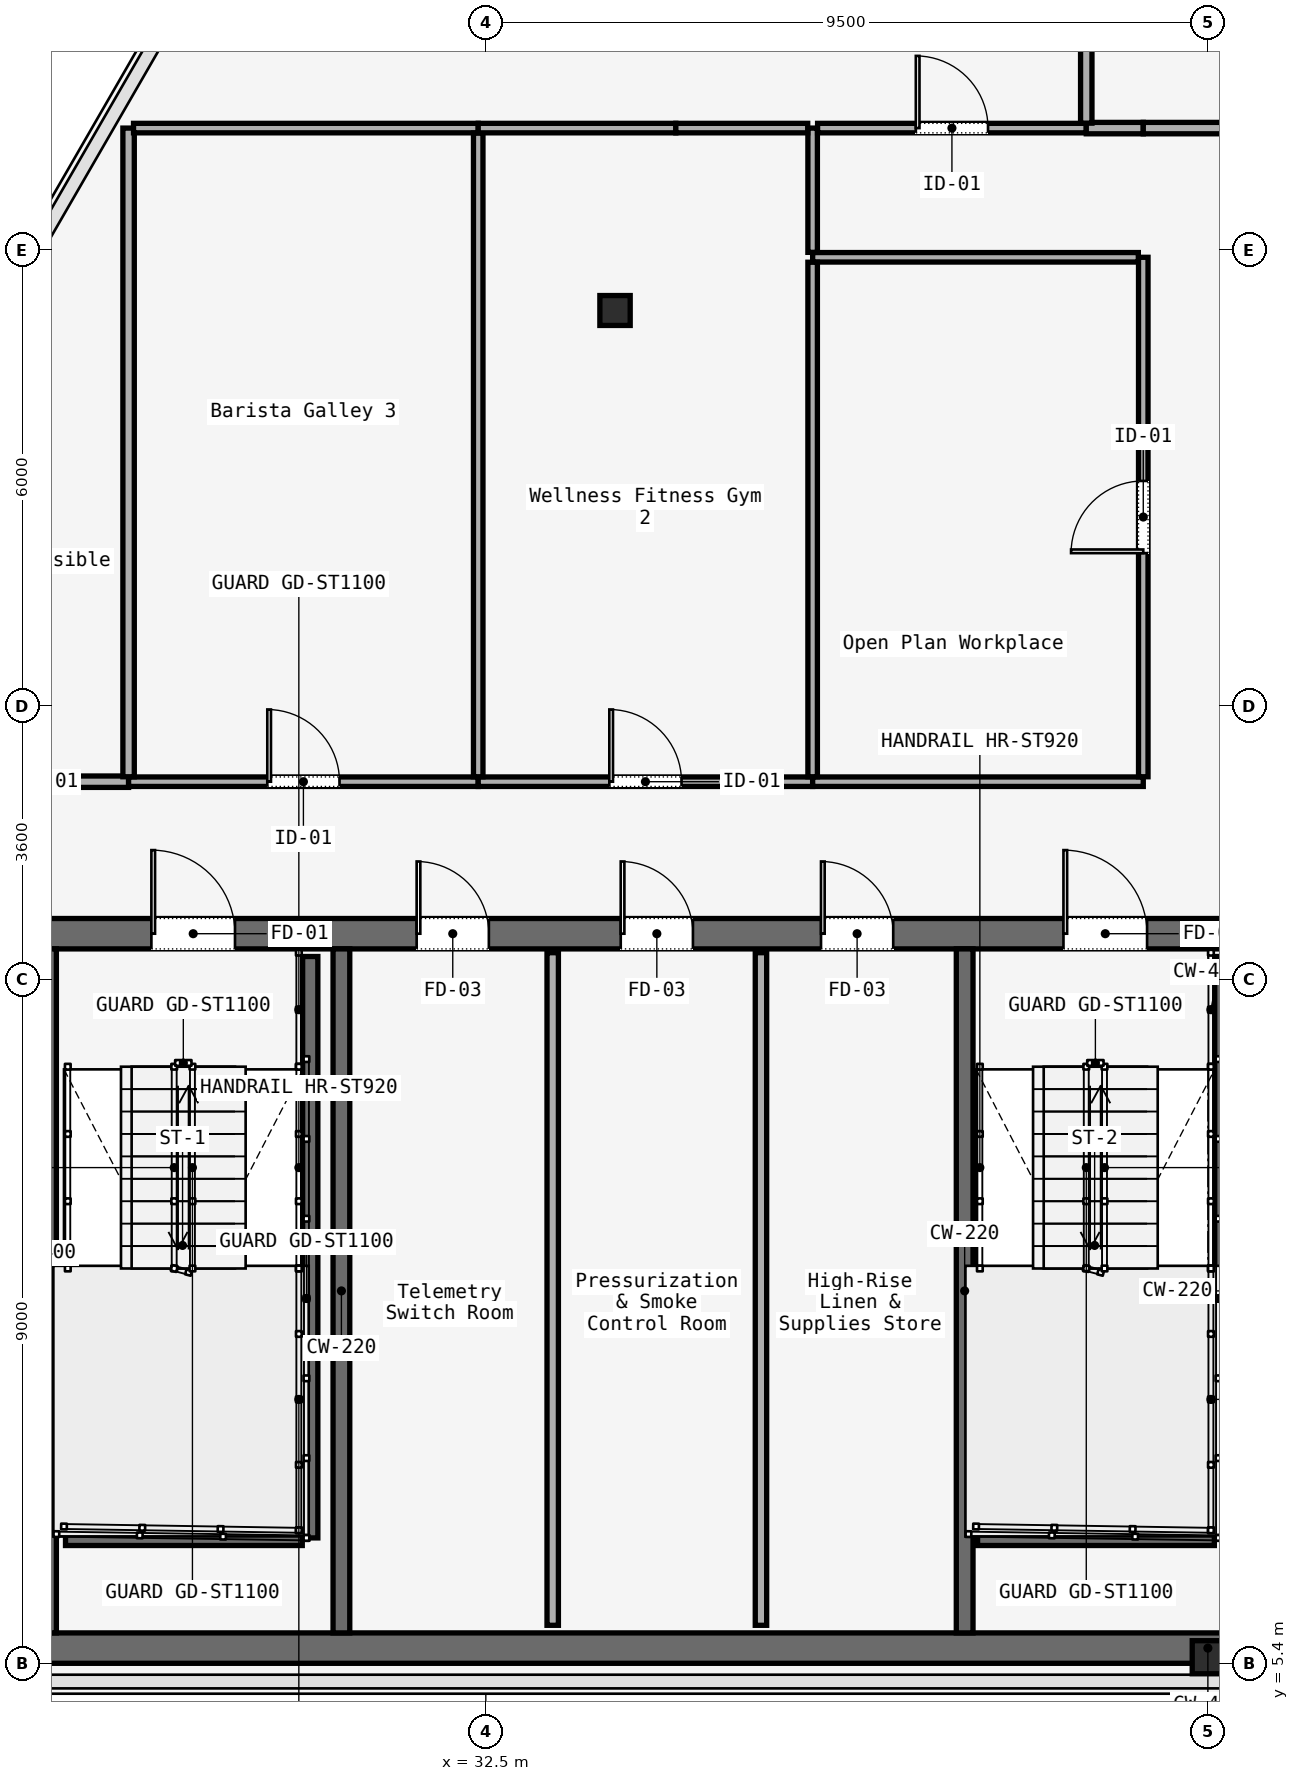
"""IFC4 building model, lengths in metres.
Left out: names, types, materials, properties, quantities, classifications, styles, units other than length and angle.
Written with IfcOpenShell. Run it as: python <this file> out.ifc"""

import sys

from ifc_helpers import new_model, si_unit, direction, frame, frame_2d, origin, origin_2d, place, context, subcontext, project, spatial, rectangle, i_section, extrude, element, fill, save


model = new_model("IFC4")
c1 = context("Model", 3, precision=1e-05, world=origin(), true_north=direction((0.0, 1.0)))
c2 = subcontext(c1, "Body", "Model", "MODEL_VIEW")
j1 = project(units=[si_unit("LENGTHUNIT", "METRE"), si_unit("PLANEANGLEUNIT", "RADIAN")], contexts=[c1])
p1 = place(None, origin())
s1 = spatial("IfcSite", under=j1, at=p1, CompositionType="ELEMENT")
p2 = place(p1, origin())
s2 = spatial("IfcBuilding", under=s1, at=p2, CompositionType="ELEMENT")
p3 = place(p2, frame((0.0, 0.0, 248.4)))
s3 = spatial("IfcBuildingStorey", under=s2, at=p3, CompositionType="ELEMENT", Elevation=248.4)
p4 = place(p3, frame((26.45, 15.0, 0.0), z_axis=(0.0, 0.0, 1.0), x_axis=(1.0, 0.0, 0.0)))
e1 = element("IfcWall", 1, at=p4, inside=s3, PredefinedType="SOLIDWALL", context=c2, shape_type="SweptSolid", body=[
    extrude(rectangle(XDim=31.1, YDim=0.4, at=frame_2d((15.55, 0.0))), origin(), (0.0, 0.0, 1.0), 3.58),
])
p5 = place(p4, frame((1.65, 0.0, 0.0)))
e2 = element("IfcOpeningElement", 2, at=p5, cuts=e1, PredefinedType="OPENING", context=c2, shape_type="SweptSolid", body=[
    extrude(rectangle(XDim=1.1, YDim=2.2, at=frame_2d((0.55, 1.1))), frame((0.0, 0.2, 0.0), z_axis=(0.0, -1.0, 0.0), x_axis=(1.0, 0.0, 0.0)), (0.0, 0.0, 1.0), 0.4),
])
p6 = place(p4, frame((13.65, 0.0, 0.0)))
e3 = element("IfcOpeningElement", 3, at=p6, cuts=e1, PredefinedType="OPENING", context=c2, shape_type="SweptSolid", body=[
    extrude(rectangle(XDim=1.1, YDim=2.2, at=frame_2d((0.55, 1.1))), frame((0.0, 0.2, 0.0), z_axis=(0.0, -1.0, 0.0), x_axis=(1.0, 0.0, 0.0)), (0.0, 0.0, 1.0), 0.4),
])
p7 = place(p4, frame((25.55, 0.0, 0.0)))
e4 = element("IfcOpeningElement", 4, at=p7, cuts=e1, PredefinedType="OPENING", context=c2, shape_type="SweptSolid", body=[
    extrude(rectangle(XDim=1.1, YDim=2.2, at=frame_2d((0.55, 1.1))), frame((0.0, 0.2, 0.0), z_axis=(0.0, -1.0, 0.0), x_axis=(1.0, 0.0, 0.0)), (0.0, 0.0, 1.0), 0.4),
])
p8 = place(p4, frame((19.35, 0.0, 0.0)))
e5 = element("IfcOpeningElement", 5, at=p8, cuts=e1, PredefinedType="OPENING", context=c2, shape_type="SweptSolid", body=[
    extrude(rectangle(XDim=1.1, YDim=2.2, at=frame_2d((0.55, 1.1))), frame((0.0, 0.2, 0.0), z_axis=(0.0, -1.0, 0.0), x_axis=(1.0, 0.0, 0.0)), (0.0, 0.0, 1.0), 0.4),
])
p9 = place(p4, frame((21.4, 0.0, 0.0)))
e6 = element("IfcOpeningElement", 6, at=p9, cuts=e1, PredefinedType="OPENING", context=c2, shape_type="SweptSolid", body=[
    extrude(rectangle(XDim=0.9, YDim=2.1, at=frame_2d((0.45, 1.05))), frame((0.0, 0.2, 0.0), z_axis=(0.0, -1.0, 0.0), x_axis=(1.0, 0.0, 0.0)), (0.0, 0.0, 1.0), 0.4),
])
p10 = place(p4, frame((5.14, 0.0, 0.0)))
e7 = element("IfcOpeningElement", 7, at=p10, cuts=e1, PredefinedType="OPENING", context=c2, shape_type="SweptSolid", body=[
    extrude(rectangle(XDim=0.95, YDim=2.2, at=frame_2d((0.475, 1.1))), frame((0.0, 0.2, 0.0), z_axis=(0.0, -1.0, 0.0), x_axis=(1.0, 0.0, 0.0)), (0.0, 0.0, 1.0), 0.4),
])
p11 = place(p4, frame((7.825, 0.0, 0.0)))
e8 = element("IfcOpeningElement", 8, at=p11, cuts=e1, PredefinedType="OPENING", context=c2, shape_type="SweptSolid", body=[
    extrude(rectangle(XDim=0.95, YDim=2.2, at=frame_2d((0.475, 1.1))), frame((0.0, 0.2, 0.0), z_axis=(0.0, -1.0, 0.0), x_axis=(1.0, 0.0, 0.0)), (0.0, 0.0, 1.0), 0.4),
])
p12 = place(p4, frame((10.46, 0.0, 0.0)))
e9 = element("IfcOpeningElement", 9, at=p12, cuts=e1, PredefinedType="OPENING", context=c2, shape_type="SweptSolid", body=[
    extrude(rectangle(XDim=0.95, YDim=2.2, at=frame_2d((0.475, 1.1))), frame((0.0, 0.2, 0.0), z_axis=(0.0, -1.0, 0.0), x_axis=(1.0, 0.0, 0.0)), (0.0, 0.0, 1.0), 0.4),
])
p13 = place(p4, frame((23.35, 0.0, 0.0)))
e10 = element("IfcOpeningElement", 10, at=p13, cuts=e1, PredefinedType="OPENING", context=c2, shape_type="SweptSolid", body=[
    extrude(rectangle(XDim=1.3, YDim=2.3, at=frame_2d((0.65, 1.15))), frame((0.0, 0.2, 0.0), z_axis=(0.0, -1.0, 0.0), x_axis=(1.0, 0.0, 0.0)), (0.0, 0.0, 1.0), 0.4),
])
p14 = place(p3, frame((26.45, 5.6, 0.0), z_axis=(0.0, 0.0, 1.0), x_axis=(1.0, 0.0, 0.0)))
e11 = element("IfcWall", 11, at=p14, inside=s3, PredefinedType="SOLIDWALL", context=c2, shape_type="SweptSolid", body=[
    extrude(rectangle(XDim=31.1, YDim=0.4, at=frame_2d((15.55, 0.0))), origin(), (0.0, 0.0, 1.0), 3.58),
])
p15 = place(p3, frame((26.65, 5.8, 0.0), z_axis=(0.0, 0.0, 1.0), x_axis=(0.0, 1.0, 0.0)))
e12 = element("IfcWall", 12, at=p15, inside=s3, PredefinedType="SOLIDWALL", context=c2, shape_type="SweptSolid", body=[
    extrude(rectangle(XDim=9.0, YDim=0.4, at=frame_2d((4.5, 0.0))), origin(), (0.0, 0.0, 1.0), 3.58),
])
for number, where, z_axis, x_axis in (
    (13, (30.6, 5.8, 0.0), (0.0, 0.0, 1.0), (0.0, 1.0, 0.0)),
    (14, (38.8, 5.8, 0.0), (0.0, 0.0, 1.0), (0.0, 1.0, 0.0)),
):
    element("IfcWall", number, at=place(p3, frame(where, z_axis=z_axis, x_axis=x_axis)), inside=s3, PredefinedType="SOLIDWALL", context=c2, shape_type="SweptSolid", body=[
        extrude(rectangle(XDim=9.0, YDim=0.22, at=frame_2d((4.5, 0.0))), origin(), (0.0, 0.0, 1.0), 3.58),
    ])
p16 = place(p3, frame((34.2, 23.2, 0.0), z_axis=(0.0, 0.0, 1.0), x_axis=(1.0, 0.0, 0.0)))
e15 = element("IfcColumn", 15, at=p16, inside=s3, PredefinedType="COLUMN", context=c2, shape_type="SweptSolid", body=[
    extrude(i_section(OverallWidth=0.399, OverallDepth=0.394, WebThickness=0.023, FlangeThickness=0.037, FilletRadius=0.015, at=origin_2d()), origin(), (0.0, 0.0, 1.0), 3.58),
])
p17 = place(p3, frame((42.0, 5.48, 0.0), z_axis=(0.0, 0.0, 1.0), x_axis=(1.0, 0.0, 0.0)))
e16 = element("IfcColumn", 16, at=p17, inside=s3, PredefinedType="COLUMN", context=c2, shape_type="SweptSolid", body=[
    extrude(i_section(OverallWidth=0.412, OverallDepth=0.435, WebThickness=0.036, FlangeThickness=0.044, FilletRadius=0.015, at=origin_2d()), origin(), (0.0, 0.0, 1.0), 3.58),
])
p18 = place(p3, frame((30.19, 14.7, 0.0), z_axis=(0.0, 0.0, 1.0), x_axis=(0.0, -1.0, 0.0)))
e17 = element("IfcWall", 17, at=p18, inside=s3, PredefinedType="SOLIDWALL", context=c2, shape_type="SweptSolid", body=[
    extrude(rectangle(XDim=7.65, YDim=0.2, at=frame_2d((3.825, 0.0))), origin(), (0.0, 0.0, 1.0), 3.8),
])
p19 = place(p3, frame((26.97, 7.05, 0.0), z_axis=(0.0, 0.0, 1.0), x_axis=(1.0, 0.0, 0.0)))
e18 = element("IfcWall", 18, at=p19, inside=s3, PredefinedType="SOLIDWALL", context=c2, shape_type="SweptSolid", body=[
    extrude(rectangle(XDim=3.115, YDim=0.2, at=frame_2d((1.558, 0.0))), origin(), (0.0, 0.0, 1.0), 3.8),
])
p20 = place(p3, frame((42.19, 14.7, 0.0), z_axis=(0.0, 0.0, 1.0), x_axis=(0.0, -1.0, 0.0)))
e19 = element("IfcWall", 19, at=p20, inside=s3, PredefinedType="SOLIDWALL", context=c2, shape_type="SweptSolid", body=[
    extrude(rectangle(XDim=7.65, YDim=0.2, at=frame_2d((3.825, 0.0))), origin(), (0.0, 0.0, 1.0), 3.8),
])
p21 = place(p3, frame((38.97, 7.05, 0.0), z_axis=(0.0, 0.0, 1.0), x_axis=(1.0, 0.0, 0.0)))
e20 = element("IfcWall", 20, at=p21, inside=s3, PredefinedType="SOLIDWALL", context=c2, shape_type="SweptSolid", body=[
    extrude(rectangle(XDim=3.115, YDim=0.2, at=frame_2d((1.558, 0.0))), origin(), (0.0, 0.0, 1.0), 3.8),
])
for number, where, z_axis, x_axis in (
    (21, (33.38, 5.9, 0.0), (0.0, 0.0, 1.0), (0.0, 1.0, 0.0)),
    (22, (36.12, 5.9, 0.0), (0.0, 0.0, 1.0), (0.0, 1.0, 0.0)),
):
    element("IfcWall", number, at=place(p3, frame(where, z_axis=z_axis, x_axis=x_axis)), inside=s3, PredefinedType="PARTITIONING", context=c2, shape_type="SweptSolid", body=[
        extrude(rectangle(XDim=8.85, YDim=0.15, at=frame_2d((4.425, 0.0))), origin(), (0.0, 0.0, 1.0), 3.01),
    ])
p22 = place(p3, frame((22.911, 17.0, 0.0), z_axis=(0.0, 0.0, 1.0), x_axis=(1.0, 0.0, 0.0)))
e23 = element("IfcWall", 23, at=p22, inside=s3, PredefinedType="PARTITIONING", context=c2, shape_type="SweptSolid", body=[
    extrude(rectangle(XDim=4.889, YDim=0.15, at=frame_2d((2.445, 0.0))), origin(), (0.0, 0.0, 1.0), 3.01),
])
p23 = place(p22, frame((1.994, 0.0, 0.0)))
e24 = element("IfcOpeningElement", 24, at=p23, cuts=e23, PredefinedType="OPENING", context=c2, shape_type="SweptSolid", body=[
    extrude(rectangle(XDim=0.9, YDim=2.15, at=frame_2d((0.45, 1.075))), frame((0.0, 0.075, 0.0), z_axis=(0.0, -1.0, 0.0), x_axis=(1.0, 0.0, 0.0)), (0.0, 0.0, 1.0), 0.15),
])
p24 = place(p3, frame((27.8, 17.0, 0.0), z_axis=(0.0, 0.0, 1.0), x_axis=(1.0, 0.0, 0.0)))
e25 = element("IfcWall", 25, at=p24, inside=s3, PredefinedType="PARTITIONING", context=c2, shape_type="SweptSolid", body=[
    extrude(rectangle(XDim=4.6, YDim=0.125, at=frame_2d((2.3, 0.0))), origin(), (0.0, 0.0, 1.0), 3.01),
])
p25 = place(p24, frame((1.825, 0.0, 0.0)))
e26 = element("IfcOpeningElement", 26, at=p25, cuts=e25, PredefinedType="OPENING", context=c2, shape_type="SweptSolid", body=[
    extrude(rectangle(XDim=0.95, YDim=2.2, at=frame_2d((0.475, 1.1))), frame((0.0, 0.062, 0.0), z_axis=(0.0, -1.0, 0.0), x_axis=(1.0, 0.0, 0.0)), (0.0, 0.0, 1.0), 0.125),
])
p26 = place(p3, frame((32.4, 17.0, 0.0), z_axis=(0.0, 0.0, 1.0), x_axis=(1.0, 0.0, 0.0)))
e27 = element("IfcWall", 27, at=p26, inside=s3, PredefinedType="PARTITIONING", context=c2, shape_type="SweptSolid", body=[
    extrude(rectangle(XDim=4.4, YDim=0.125, at=frame_2d((2.2, 0.0))), origin(), (0.0, 0.0, 1.0), 3.01),
])
p27 = place(p26, frame((1.725, 0.0, 0.0)))
e28 = element("IfcOpeningElement", 28, at=p27, cuts=e27, PredefinedType="OPENING", context=c2, shape_type="SweptSolid", body=[
    extrude(rectangle(XDim=0.95, YDim=2.2, at=frame_2d((0.475, 1.1))), frame((0.0, 0.062, 0.0), z_axis=(0.0, -1.0, 0.0), x_axis=(1.0, 0.0, 0.0)), (0.0, 0.0, 1.0), 0.125),
])
p28 = place(p3, frame((36.8, 17.0, 0.0), z_axis=(0.0, 0.0, 1.0), x_axis=(1.0, 0.0, 0.0)))
e29 = element("IfcWall", 29, at=p28, inside=s3, PredefinedType="PARTITIONING", context=c2, shape_type="SweptSolid", body=[
    extrude(rectangle(XDim=4.35, YDim=0.125, at=frame_2d((2.175, 0.0))), origin(), (0.0, 0.0, 1.0), 3.01),
])
p29 = place(p3, frame((41.15, 17.065, 0.0), z_axis=(0.0, 0.0, 1.0), x_axis=(0.0, 1.0, 0.0)))
e30 = element("IfcWall", 30, at=p29, inside=s3, PredefinedType="PARTITIONING", context=c2, shape_type="SweptSolid", body=[
    extrude(rectangle(XDim=6.835, YDim=0.125, at=frame_2d((3.417, 0.0))), origin(), (0.0, 0.0, 1.0), 3.01),
])
p30 = place(p29, frame((2.942, 0.0, 0.0)))
e31 = element("IfcOpeningElement", 31, at=p30, cuts=e30, PredefinedType="OPENING", context=c2, shape_type="SweptSolid", body=[
    extrude(rectangle(XDim=0.95, YDim=2.2, at=frame_2d((0.475, 1.1))), frame((0.0, 0.062, 0.0), z_axis=(0.0, -1.0, 0.0), x_axis=(1.0, 0.0, 0.0)), (0.0, 0.0, 1.0), 0.125),
])
p31 = place(p3, frame((41.085, 23.9, 0.0), z_axis=(0.0, 0.0, 1.0), x_axis=(-1.0, 0.0, 0.0)))
e32 = element("IfcWall", 32, at=p31, inside=s3, PredefinedType="PARTITIONING", context=c2, shape_type="SweptSolid", body=[
    extrude(rectangle(XDim=4.285, YDim=0.125, at=frame_2d((2.143, 0.0))), origin(), (0.0, 0.0, 1.0), 3.01),
])
p32 = place(p3, frame((36.8, 23.965, 0.0), z_axis=(0.0, 0.0, 1.0), x_axis=(0.0, 1.0, 0.0)))
e33 = element("IfcWall", 33, at=p32, inside=s3, PredefinedType="PARTITIONING", context=c2, shape_type="SweptSolid", body=[
    extrude(rectangle(XDim=1.635, YDim=0.125, at=frame_2d((0.817, 0.0))), origin(), (0.0, 0.0, 1.0), 3.01),
])
p33 = place(p3, frame((36.865, 25.6, 0.0), z_axis=(0.0, 0.0, 1.0), x_axis=(1.0, 0.0, 0.0)))
e34 = element("IfcWall", 34, at=p33, inside=s3, PredefinedType="PARTITIONING", context=c2, shape_type="SweptSolid", body=[
    extrude(rectangle(XDim=3.535, YDim=0.125, at=frame_2d((1.768, 0.0))), origin(), (0.0, 0.0, 1.0), 3.01),
])
p34 = place(p33, frame((1.292, 0.0, 0.0)))
e35 = element("IfcOpeningElement", 35, at=p34, cuts=e34, PredefinedType="OPENING", context=c2, shape_type="SweptSolid", body=[
    extrude(rectangle(XDim=0.95, YDim=2.2, at=frame_2d((0.475, 1.1))), frame((0.0, 0.062, 0.0), z_axis=(0.0, -1.0, 0.0), x_axis=(1.0, 0.0, 0.0)), (0.0, 0.0, 1.0), 0.125),
])
p35 = place(p3, frame((40.4, 25.6, 0.0), z_axis=(0.0, 0.0, 1.0), x_axis=(1.0, 0.0, 0.0)))
e36 = element("IfcWall", 36, at=p35, inside=s3, PredefinedType="PARTITIONING", context=c2, shape_type="SweptSolid", body=[
    extrude(rectangle(XDim=0.75, YDim=0.15, at=frame_2d((0.375, 0.0))), origin(), (0.0, 0.0, 1.0), 3.01),
])
p36 = place(p3, frame((41.15, 25.6, 0.0), z_axis=(0.0, 0.0, 1.0), x_axis=(1.0, 0.0, 0.0)))
e37 = element("IfcWall", 37, at=p36, inside=s3, PredefinedType="PARTITIONING", context=c2, shape_type="SweptSolid", body=[
    extrude(rectangle(XDim=1.7, YDim=0.15, at=frame_2d((0.85, 0.0))), origin(), (0.0, 0.0, 1.0), 3.01),
])
p37 = place(p3, frame((27.8, 25.6, 0.0), z_axis=(0.0, 0.0, 1.0), x_axis=(0.0, -1.0, 0.0)))
e38 = element("IfcWall", 38, at=p37, inside=s3, PredefinedType="PARTITIONING", context=c2, shape_type="SweptSolid", body=[
    extrude(rectangle(XDim=8.535, YDim=0.15, at=frame_2d((4.268, 0.0))), origin(), (0.0, 0.0, 1.0), 3.01),
])
p38 = place(p3, frame((36.8, 17.065, 0.0), z_axis=(0.0, 0.0, 1.0), x_axis=(0.0, 1.0, 0.0)))
e39 = element("IfcWall", 39, at=p38, inside=s3, PredefinedType="PARTITIONING", context=c2, shape_type="SweptSolid", body=[
    extrude(rectangle(XDim=6.77, YDim=0.125, at=frame_2d((3.385, 0.0))), origin(), (0.0, 0.0, 1.0), 3.01),
])
p39 = place(p3, frame((27.865, 25.6, 0.0), z_axis=(0.0, 0.0, 1.0), x_axis=(1.0, 0.0, 0.0)))
e40 = element("IfcWall", 40, at=p39, inside=s3, PredefinedType="PARTITIONING", context=c2, shape_type="SweptSolid", body=[
    extrude(rectangle(XDim=4.535, YDim=0.125, at=frame_2d((2.268, 0.0))), origin(), (0.0, 0.0, 1.0), 3.01),
])
p40 = place(p3, frame((32.4, 25.535, 0.0), z_axis=(0.0, 0.0, 1.0), x_axis=(0.0, -1.0, 0.0)))
e41 = element("IfcWall", 41, at=p40, inside=s3, PredefinedType="PARTITIONING", context=c2, shape_type="SweptSolid", body=[
    extrude(rectangle(XDim=8.47, YDim=0.125, at=frame_2d((4.235, 0.0))), origin(), (0.0, 0.0, 1.0), 3.01),
])
p41 = place(p3, frame((32.4, 25.6, 0.0), z_axis=(0.0, 0.0, 1.0), x_axis=(1.0, 0.0, 0.0)))
e42 = element("IfcWall", 42, at=p41, inside=s3, PredefinedType="PARTITIONING", context=c2, shape_type="SweptSolid", body=[
    extrude(rectangle(XDim=2.6, YDim=0.125, at=frame_2d((1.3, 0.0))), origin(), (0.0, 0.0, 1.0), 3.01),
])
p42 = place(p3, frame((35.0, 25.6, 0.0), z_axis=(0.0, 0.0, 1.0), x_axis=(1.0, 0.0, 0.0)))
e43 = element("IfcWall", 43, at=p42, inside=s3, PredefinedType="PARTITIONING", context=c2, shape_type="SweptSolid", body=[
    extrude(rectangle(XDim=1.735, YDim=0.125, at=frame_2d((0.868, 0.0))), origin(), (0.0, 0.0, 1.0), 3.01),
])
p43 = place(p3, frame((40.4, 44.99, 0.0), z_axis=(0.0, 0.0, 1.0), x_axis=(0.0, -1.0, 0.0)))
e44 = element("IfcWall", 44, at=p43, inside=s3, PredefinedType="PARTITIONING", context=c2, shape_type="SweptSolid", body=[
    extrude(rectangle(XDim=19.324, YDim=0.15, at=frame_2d((9.662, 0.0))), origin(), (0.0, 0.0, 1.0), 3.01),
])
p44 = place(p5, origin())
e45 = element("IfcDoor", 45, at=p44, inside=s3, OperationType="SINGLE_SWING_LEFT", PredefinedType="DOOR", context=c2, shape_type="SweptSolid", body=[
    extrude(rectangle(XDim=1.1, YDim=2.2, at=frame_2d((0.55, 1.1))), frame((0.0, 0.025, 0.0), z_axis=(0.0, -1.0, 0.0), x_axis=(1.0, 0.0, 0.0)), (0.0, 0.0, 1.0), 0.05),
])
fill(e2, e45)
p45 = place(p6, origin())
e46 = element("IfcDoor", 46, at=p45, inside=s3, OperationType="SINGLE_SWING_RIGHT", PredefinedType="DOOR", context=c2, shape_type="SweptSolid", body=[
    extrude(rectangle(XDim=1.1, YDim=2.2, at=frame_2d((0.55, 1.1))), frame((0.0, 0.025, 0.0), z_axis=(0.0, -1.0, 0.0), x_axis=(1.0, 0.0, 0.0)), (0.0, 0.0, 1.0), 0.05),
])
fill(e3, e46)
p46 = place(p10, origin())
e47 = element("IfcDoor", 47, at=p46, inside=s3, OperationType="SINGLE_SWING_LEFT", PredefinedType="DOOR", context=c2, shape_type="SweptSolid", body=[
    extrude(rectangle(XDim=0.95, YDim=2.2, at=frame_2d((0.475, 1.1))), frame((0.0, 0.025, 0.0), z_axis=(0.0, -1.0, 0.0), x_axis=(1.0, 0.0, 0.0)), (0.0, 0.0, 1.0), 0.05),
])
fill(e7, e47)
p47 = place(p11, origin())
e48 = element("IfcDoor", 48, at=p47, inside=s3, OperationType="SINGLE_SWING_RIGHT", PredefinedType="DOOR", context=c2, shape_type="SweptSolid", body=[
    extrude(rectangle(XDim=0.95, YDim=2.2, at=frame_2d((0.475, 1.1))), frame((0.0, 0.025, 0.0), z_axis=(0.0, -1.0, 0.0), x_axis=(1.0, 0.0, 0.0)), (0.0, 0.0, 1.0), 0.05),
])
fill(e8, e48)
p48 = place(p12, origin())
e49 = element("IfcDoor", 49, at=p48, inside=s3, OperationType="SINGLE_SWING_LEFT", PredefinedType="DOOR", context=c2, shape_type="SweptSolid", body=[
    extrude(rectangle(XDim=0.95, YDim=2.2, at=frame_2d((0.475, 1.1))), frame((0.0, 0.025, 0.0), z_axis=(0.0, -1.0, 0.0), x_axis=(1.0, 0.0, 0.0)), (0.0, 0.0, 1.0), 0.05),
])
fill(e9, e49)
p49 = place(p30, origin())
e50 = element("IfcDoor", 50, at=p49, inside=s3, OperationType="SINGLE_SWING_LEFT", PredefinedType="DOOR", context=c2, shape_type="SweptSolid", body=[
    extrude(rectangle(XDim=0.95, YDim=2.2, at=frame_2d((0.475, 1.1))), frame((0.0, 0.025, 0.0), z_axis=(0.0, -1.0, 0.0), x_axis=(1.0, 0.0, 0.0)), (0.0, 0.0, 1.0), 0.05),
])
fill(e31, e50)
p50 = place(p25, origin())
e51 = element("IfcDoor", 51, at=p50, inside=s3, OperationType="SINGLE_SWING_RIGHT", PredefinedType="DOOR", context=c2, shape_type="SweptSolid", body=[
    extrude(rectangle(XDim=0.95, YDim=2.2, at=frame_2d((0.475, 1.1))), frame((0.0, 0.025, 0.0), z_axis=(0.0, -1.0, 0.0), x_axis=(1.0, 0.0, 0.0)), (0.0, 0.0, 1.0), 0.05),
])
fill(e26, e51)
p51 = place(p27, origin())
e52 = element("IfcDoor", 52, at=p51, inside=s3, OperationType="SINGLE_SWING_LEFT", PredefinedType="DOOR", context=c2, shape_type="SweptSolid", body=[
    extrude(rectangle(XDim=0.95, YDim=2.2, at=frame_2d((0.475, 1.1))), frame((0.0, 0.025, 0.0), z_axis=(0.0, -1.0, 0.0), x_axis=(1.0, 0.0, 0.0)), (0.0, 0.0, 1.0), 0.05),
])
fill(e28, e52)
p52 = place(p34, origin())
e53 = element("IfcDoor", 53, at=p52, inside=s3, OperationType="SINGLE_SWING_RIGHT", PredefinedType="DOOR", context=c2, shape_type="SweptSolid", body=[
    extrude(rectangle(XDim=0.95, YDim=2.2, at=frame_2d((0.475, 1.1))), frame((0.0, 0.025, 0.0), z_axis=(0.0, -1.0, 0.0), x_axis=(1.0, 0.0, 0.0)), (0.0, 0.0, 1.0), 0.05),
])
fill(e35, e53)
save(model, sys.argv[1])
